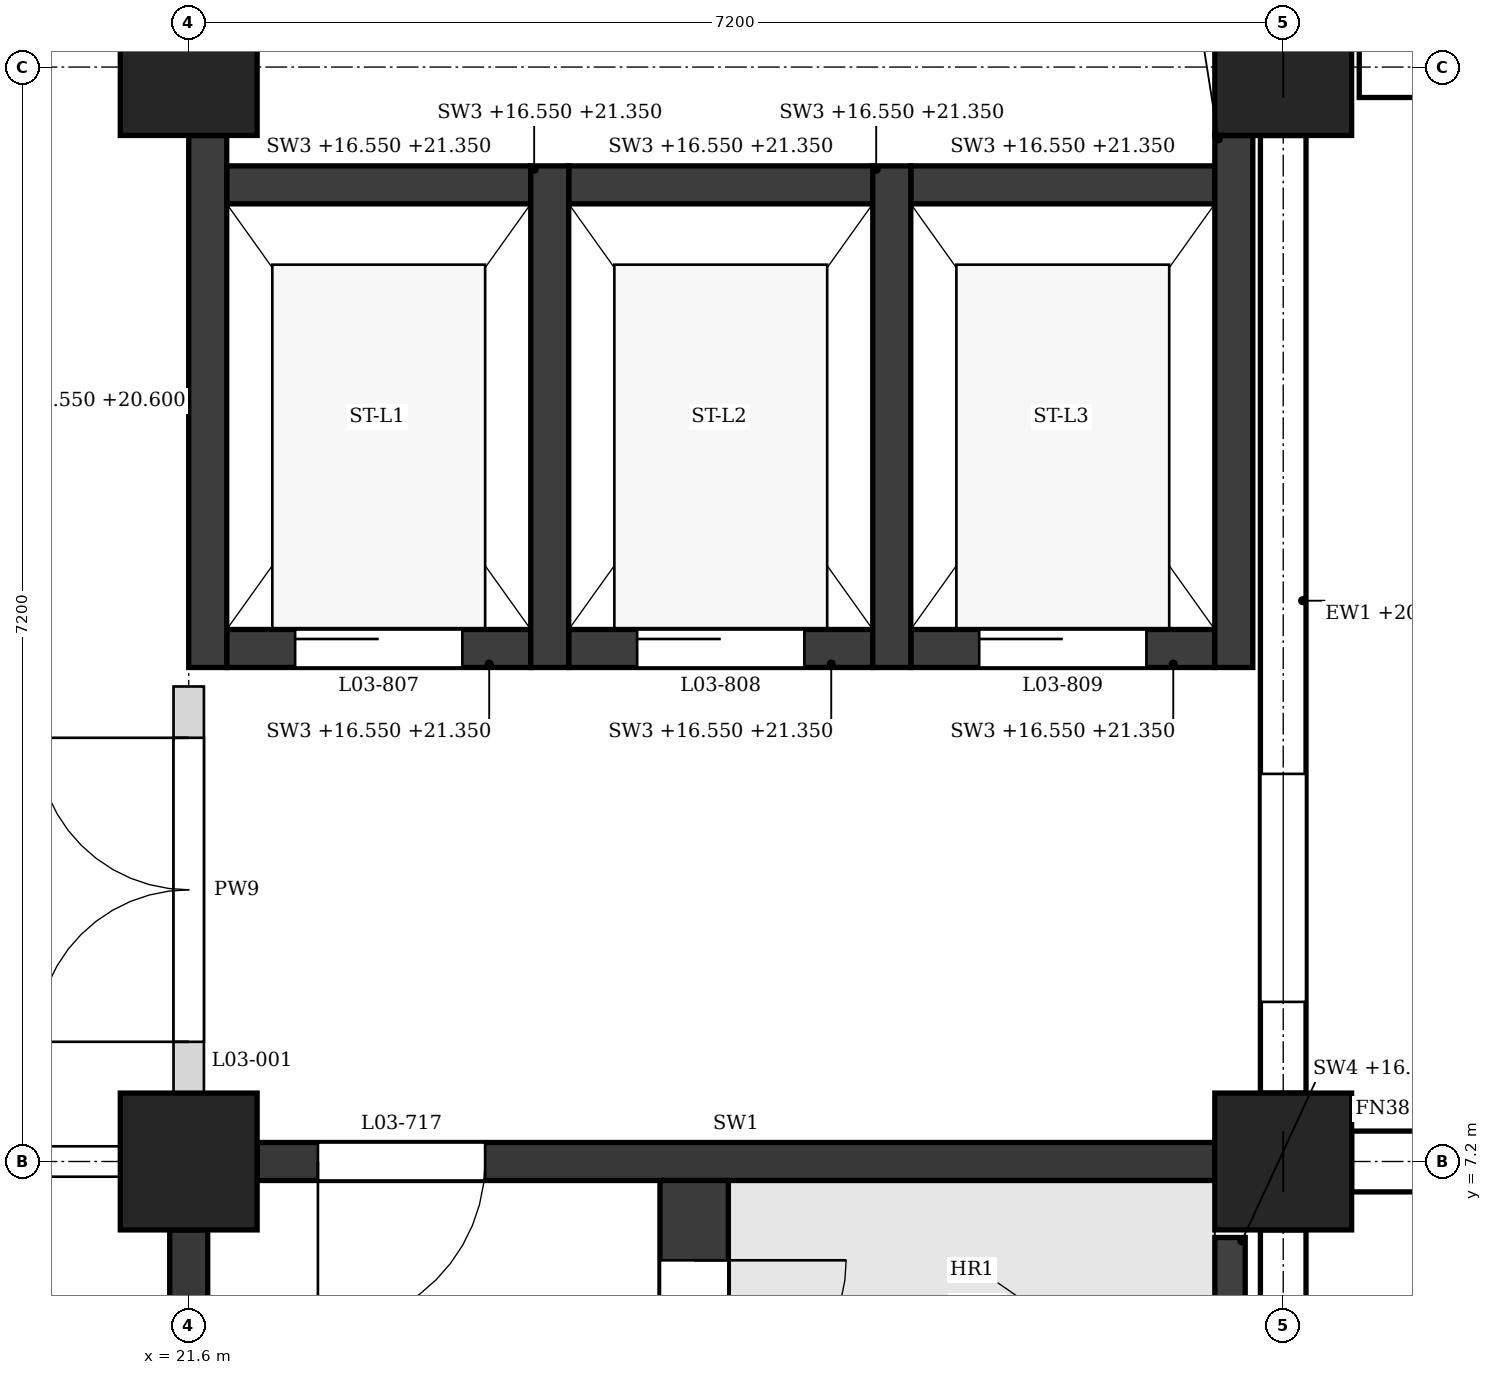
"""IFC4 building model, lengths in metres.
Left out: names, types, materials, properties, quantities, classifications, styles, units other than length and angle.
Written with IfcOpenShell. Run it as: python <this file> out.ifc"""

import sys

from ifc_helpers import new_model, si_unit, direction, frame, frame_2d, origin, origin_2d, place, context, subcontext, project, spatial, polyline, rectangle, outline, extrude, element, fill, save


model = new_model("IFC4")
c1 = context("Model", 3, precision=1e-05, world=origin(), true_north=direction((0.0, 1.0)))
c2 = subcontext(c1, "Body", "Model", "MODEL_VIEW")
j1 = project(units=[si_unit("LENGTHUNIT", "METRE"), si_unit("PLANEANGLEUNIT", "RADIAN")], contexts=[c1])
p1 = place(None, origin())
s1 = spatial("IfcSite", under=j1, at=p1, CompositionType="ELEMENT")
p2 = place(p1, origin())
s2 = spatial("IfcBuilding", under=s1, at=p2, CompositionType="ELEMENT")
p3 = place(p2, frame((0.0, 0.0, 16.8)))
s3 = spatial("IfcBuildingStorey", under=s2, at=p3, CompositionType="ELEMENT", Elevation=16.8)
for number, where, z_axis, x_axis in (
    (1, (21.6, 7.2, 0.0), (0.0, 0.0, 1.0), (1.0, 0.0, 0.0)),
    (2, (21.6, 14.4, 0.0), (0.0, 0.0, 1.0), (1.0, 0.0, 0.0)),
    (3, (28.8, 7.2, 0.0), (0.0, 0.0, 1.0), (1.0, 0.0, 0.0)),
    (4, (28.8, 14.4, 0.0), (0.0, 0.0, 1.0), (1.0, 0.0, 0.0)),
):
    element("IfcColumn", number, at=place(p3, frame(where, z_axis=z_axis, x_axis=x_axis)), inside=s3, PredefinedType="COLUMN", context=c2, shape_type="SweptSolid", body=[
        extrude(rectangle(XDim=0.9, YDim=0.9, at=origin_2d()), origin(), (0.0, 0.0, 1.0), 4.8),
    ])
p4 = place(p3, frame((28.8, 0.45, 0.0), z_axis=(0.0, 0.0, 1.0), x_axis=(0.0, 1.0, 0.0)))
e5 = element("IfcWall", 5, at=p4, inside=s3, PredefinedType="STANDARD", context=c2, shape_type="SweptSolid", body=[
    extrude(rectangle(XDim=6.3, YDim=0.3, at=frame_2d((3.15, 0.0))), origin(), (0.0, 0.0, 1.0), 3.95),
])
p5 = place(p4, frame((0.9, 0.0, 0.9)))
e6 = element("IfcOpeningElement", 6, at=p5, cuts=e5, PredefinedType="OPENING", context=c2, shape_type="SweptSolid", body=[
    extrude(outline(polyline([(0.0, 0.0), (0.9, 0.0), (0.9, 2.05), (0.45, 2.5), (0.0, 2.05), (0.0, 0.0)])), frame((0.0, 0.16, 0.0), z_axis=(0.0, -1.0, 0.0), x_axis=(1.0, 0.0, 0.0)), (0.0, 0.0, 1.0), 0.32),
])
p6 = place(p4, frame((4.5, 0.0, 0.9)))
e7 = element("IfcOpeningElement", 7, at=p6, cuts=e5, PredefinedType="OPENING", context=c2, shape_type="SweptSolid", body=[
    extrude(outline(polyline([(0.0, 0.0), (0.9, 0.0), (0.9, 2.05), (0.45, 2.5), (0.0, 2.05), (0.0, 0.0)])), frame((0.0, 0.16, 0.0), z_axis=(0.0, -1.0, 0.0), x_axis=(1.0, 0.0, 0.0)), (0.0, 0.0, 1.0), 0.32),
])
p7 = place(p3, frame((28.8, 7.65, 0.0), z_axis=(0.0, 0.0, 1.0), x_axis=(0.0, 1.0, 0.0)))
e8 = element("IfcWall", 8, at=p7, inside=s3, PredefinedType="STANDARD", context=c2, shape_type="SweptSolid", body=[
    extrude(rectangle(XDim=6.3, YDim=0.3, at=frame_2d((3.15, 0.0))), origin(), (0.0, 0.0, 1.0), 3.95),
])
p8 = place(p7, frame((0.6, 0.0, 0.9)))
e9 = element("IfcOpeningElement", 9, at=p8, cuts=e8, PredefinedType="OPENING", context=c2, shape_type="SweptSolid", body=[
    extrude(outline(polyline([(0.0, 0.0), (1.5, 0.0), (1.5, 1.75), (0.75, 2.5), (0.0, 1.75), (0.0, 0.0)])), frame((0.0, 0.16, 0.0), z_axis=(0.0, -1.0, 0.0), x_axis=(1.0, 0.0, 0.0)), (0.0, 0.0, 1.0), 0.32),
])
for number, where, z_axis, x_axis in (
    (10, (29.25, 7.2, 0.0), (0.0, 0.0, 1.0), (1.0, 0.0, 0.0)),
    (11, (29.3, 14.4, 0.0), (0.0, 0.0, 1.0), (1.0, 0.0, 0.0)),
):
    element("IfcWall", number, at=place(p3, frame(where, z_axis=z_axis, x_axis=x_axis)), inside=s3, PredefinedType="POLYGONAL", context=c2, shape_type="SweptSolid", body=[
        extrude(outline(polyline([(0.6, 0.0), (0.6, 4.55), (0.0, 4.55), (0.0, 0.0), (0.6, 0.0)])), frame((0.0, 0.2, 0.0), z_axis=(0.0, -1.0, 0.0), x_axis=(1.0, 0.0, 0.0)), (0.0, 0.0, 1.0), 0.4),
    ])
p9 = place(p3, frame((22.05, 7.2, 0.0), z_axis=(0.0, 0.0, 1.0), x_axis=(1.0, 0.0, 0.0)))
e12 = element("IfcWall", 12, at=p9, inside=s3, PredefinedType="SHEAR", context=c2, shape_type="SweptSolid", body=[
    extrude(rectangle(XDim=6.3, YDim=0.25, at=frame_2d((3.15, 0.0))), origin(), (0.0, 0.0, 1.0), 3.8),
])
p10 = place(p9, frame((0.4, 0.0, 0.0)))
e13 = element("IfcOpeningElement", 13, at=p10, cuts=e12, PredefinedType="OPENING", context=c2, shape_type="SweptSolid", body=[
    extrude(rectangle(XDim=1.1, YDim=2.1, at=frame_2d((0.55, 1.05))), frame((0.0, 0.135, 0.0), z_axis=(0.0, -1.0, 0.0), x_axis=(1.0, 0.0, 0.0)), (0.0, 0.0, 1.0), 0.27),
])
p11 = place(p3, frame((21.6, 0.45, 0.0), z_axis=(0.0, 0.0, 1.0), x_axis=(0.0, 1.0, 0.0)))
e14 = element("IfcWall", 14, at=p11, inside=s3, PredefinedType="SHEAR", context=c2, shape_type="SweptSolid", body=[
    extrude(rectangle(XDim=6.3, YDim=0.25, at=frame_2d((3.15, 0.0))), origin(), (0.0, 0.0, 1.0), 3.8),
])
p12 = place(p3, frame((28.45, 5.85, -0.25), z_axis=(0.0, 0.0, 1.0), x_axis=(0.0, 1.0, 0.0)))
e15 = element("IfcWall", 15, at=p12, inside=s3, PredefinedType="SHEAR", context=c2, shape_type="SweptSolid", body=[
    extrude(rectangle(XDim=0.85, YDim=0.2, at=frame_2d((0.425, 0.0))), origin(), (0.0, 0.0, 1.0), 4.8),
])
p13 = place(p3, frame((24.925, 0.225, 0.0), z_axis=(0.0, 0.0, 1.0), x_axis=(0.0, 1.0, 0.0)))
e16 = element("IfcWall", 16, at=p13, inside=s3, PredefinedType="SHEAR", context=c2, shape_type="SweptSolid", body=[
    extrude(rectangle(XDim=6.85, YDim=0.45, at=frame_2d((3.425, 0.0))), origin(), (0.0, 0.0, 1.0), 4.55),
])
p14 = place(p13, frame((5.325, 0.0, 0.0)))
e17 = element("IfcOpeningElement", 17, at=p14, cuts=e16, PredefinedType="OPENING", context=c2, shape_type="SweptSolid", body=[
    extrude(rectangle(XDim=1.0, YDim=2.1, at=frame_2d((0.5, 1.05))), frame((0.0, 0.235, 0.0), z_axis=(0.0, -1.0, 0.0), x_axis=(1.0, 0.0, 0.0)), (0.0, 0.0, 1.0), 0.47),
])
p15 = place(p3, frame((21.725, 10.45, -0.25), z_axis=(0.0, 0.0, 1.0), x_axis=(0.0, 1.0, 0.0)))
e18 = element("IfcWall", 18, at=p15, inside=s3, PredefinedType="SHEAR", context=c2, shape_type="SweptSolid", body=[
    extrude(rectangle(XDim=3.5, YDim=0.25, at=frame_2d((1.75, 0.0))), origin(), (0.0, 0.0, 1.0), 4.05),
])
for number, where, z_axis, x_axis in (
    (19, (23.975, 10.45, -0.25), (0.0, 0.0, 1.0), (0.0, 1.0, 0.0)),
    (20, (26.225, 10.45, -0.25), (0.0, 0.0, 1.0), (0.0, 1.0, 0.0)),
):
    element("IfcWall", number, at=place(p3, frame(where, z_axis=z_axis, x_axis=x_axis)), inside=s3, PredefinedType="SHEAR", context=c2, shape_type="SweptSolid", body=[
        extrude(rectangle(XDim=3.3, YDim=0.25, at=frame_2d((1.65, 0.0))), origin(), (0.0, 0.0, 1.0), 4.8),
    ])
p16 = place(p3, frame((28.475, 10.45, -0.25), z_axis=(0.0, 0.0, 1.0), x_axis=(0.0, 1.0, 0.0)))
e21 = element("IfcWall", 21, at=p16, inside=s3, PredefinedType="SHEAR", context=c2, shape_type="SweptSolid", body=[
    extrude(rectangle(XDim=3.5, YDim=0.25, at=frame_2d((1.75, 0.0))), origin(), (0.0, 0.0, 1.0), 4.8),
])
p17 = place(p3, frame((21.85, 10.575, -0.25), z_axis=(0.0, 0.0, 1.0), x_axis=(1.0, 0.0, 0.0)))
e22 = element("IfcWall", 22, at=p17, inside=s3, PredefinedType="SHEAR", context=c2, shape_type="SweptSolid", body=[
    extrude(rectangle(XDim=2.0, YDim=0.25, at=frame_2d((1.0, 0.0))), origin(), (0.0, 0.0, 1.0), 4.8),
])
p18 = place(p17, frame((0.45, 0.0, 0.25)))
e23 = element("IfcOpeningElement", 23, at=p18, cuts=e22, PredefinedType="OPENING", context=c2, shape_type="SweptSolid", body=[
    extrude(rectangle(XDim=1.1, YDim=2.1, at=frame_2d((0.55, 1.05))), frame((0.0, 0.135, 0.0), z_axis=(0.0, -1.0, 0.0), x_axis=(1.0, 0.0, 0.0)), (0.0, 0.0, 1.0), 0.27),
])
p19 = place(p3, frame((21.85, 13.625, -0.25), z_axis=(0.0, 0.0, 1.0), x_axis=(1.0, 0.0, 0.0)))
e24 = element("IfcWall", 24, at=p19, inside=s3, PredefinedType="SHEAR", context=c2, shape_type="SweptSolid", body=[
    extrude(rectangle(XDim=2.0, YDim=0.25, at=frame_2d((1.0, 0.0))), origin(), (0.0, 0.0, 1.0), 4.8),
])
p20 = place(p3, frame((24.1, 10.575, -0.25), z_axis=(0.0, 0.0, 1.0), x_axis=(1.0, 0.0, 0.0)))
e25 = element("IfcWall", 25, at=p20, inside=s3, PredefinedType="SHEAR", context=c2, shape_type="SweptSolid", body=[
    extrude(rectangle(XDim=2.0, YDim=0.25, at=frame_2d((1.0, 0.0))), origin(), (0.0, 0.0, 1.0), 4.8),
])
p21 = place(p20, frame((0.45, 0.0, 0.25)))
e26 = element("IfcOpeningElement", 26, at=p21, cuts=e25, PredefinedType="OPENING", context=c2, shape_type="SweptSolid", body=[
    extrude(rectangle(XDim=1.1, YDim=2.1, at=frame_2d((0.55, 1.05))), frame((0.0, 0.135, 0.0), z_axis=(0.0, -1.0, 0.0), x_axis=(1.0, 0.0, 0.0)), (0.0, 0.0, 1.0), 0.27),
])
p22 = place(p3, frame((24.1, 13.625, -0.25), z_axis=(0.0, 0.0, 1.0), x_axis=(1.0, 0.0, 0.0)))
e27 = element("IfcWall", 27, at=p22, inside=s3, PredefinedType="SHEAR", context=c2, shape_type="SweptSolid", body=[
    extrude(rectangle(XDim=2.0, YDim=0.25, at=frame_2d((1.0, 0.0))), origin(), (0.0, 0.0, 1.0), 4.8),
])
p23 = place(p3, frame((26.35, 10.575, -0.25), z_axis=(0.0, 0.0, 1.0), x_axis=(1.0, 0.0, 0.0)))
e28 = element("IfcWall", 28, at=p23, inside=s3, PredefinedType="SHEAR", context=c2, shape_type="SweptSolid", body=[
    extrude(rectangle(XDim=2.0, YDim=0.25, at=frame_2d((1.0, 0.0))), origin(), (0.0, 0.0, 1.0), 4.8),
])
p24 = place(p23, frame((0.45, 0.0, 0.25)))
e29 = element("IfcOpeningElement", 29, at=p24, cuts=e28, PredefinedType="OPENING", context=c2, shape_type="SweptSolid", body=[
    extrude(rectangle(XDim=1.1, YDim=2.1, at=frame_2d((0.55, 1.05))), frame((0.0, 0.135, 0.0), z_axis=(0.0, -1.0, 0.0), x_axis=(1.0, 0.0, 0.0)), (0.0, 0.0, 1.0), 0.27),
])
p25 = place(p3, frame((26.35, 13.625, -0.25), z_axis=(0.0, 0.0, 1.0), x_axis=(1.0, 0.0, 0.0)))
e30 = element("IfcWall", 30, at=p25, inside=s3, PredefinedType="SHEAR", context=c2, shape_type="SweptSolid", body=[
    extrude(rectangle(XDim=2.0, YDim=0.25, at=frame_2d((1.0, 0.0))), origin(), (0.0, 0.0, 1.0), 4.8),
])
p26 = place(p3, frame((14.85, 7.2, 0.0), z_axis=(0.0, 0.0, 1.0), x_axis=(1.0, 0.0, 0.0)))
e31 = element("IfcWall", 31, at=p26, inside=s3, PredefinedType="PARTITIONING", context=c2, shape_type="SweptSolid", body=[
    extrude(rectangle(XDim=6.3, YDim=0.2, at=frame_2d((3.15, 0.0))), origin(), (0.0, 0.0, 1.0), 3.8),
])
p27 = place(p26, frame((4.225, 0.0, 0.0)))
e32 = element("IfcOpeningElement", 32, at=p27, cuts=e31, PredefinedType="OPENING", context=c2, shape_type="SweptSolid", body=[
    extrude(rectangle(XDim=1.0, YDim=2.1, at=frame_2d((0.5, 1.05))), frame((0.0, 0.11, 0.0), z_axis=(0.0, -1.0, 0.0), x_axis=(1.0, 0.0, 0.0)), (0.0, 0.0, 1.0), 0.22),
])
p28 = place(p3, frame((21.6, 7.65, 0.0), z_axis=(0.0, 0.0, 1.0), x_axis=(0.0, 1.0, 0.0)))
e33 = element("IfcWall", 33, at=p28, inside=s3, PredefinedType="PARTITIONING", context=c2, shape_type="SweptSolid", body=[
    extrude(rectangle(XDim=2.675, YDim=0.2, at=frame_2d((1.337, 0.0))), origin(), (0.0, 0.0, 1.0), 3.8),
])
p29 = place(p28, frame((0.337, 0.0, 0.0)))
e34 = element("IfcOpeningElement", 34, at=p29, cuts=e33, PredefinedType="OPENING", context=c2, shape_type="SweptSolid", body=[
    extrude(rectangle(XDim=2.0, YDim=2.4, at=frame_2d((1.0, 1.2))), frame((0.0, 0.11, 0.0), z_axis=(0.0, -1.0, 0.0), x_axis=(1.0, 0.0, 0.0)), (0.0, 0.0, 1.0), 0.22),
])
p30 = place(p8, origin())
e35 = element("IfcWindow", 35, at=p30, inside=s3, PartitioningType="SINGLE_PANEL", PredefinedType="WINDOW", context=c2, shape_type="SweptSolid", body=[
    extrude(outline(polyline([(0.0, 0.0), (1.5, 0.0), (1.5, 1.75), (0.75, 2.5), (0.0, 1.75), (0.0, 0.0)])), frame((0.0, 0.03, 0.0), z_axis=(0.0, -1.0, 0.0), x_axis=(1.0, 0.0, 0.0)), (0.0, 0.0, 1.0), 0.06),
])
fill(e9, e35)
p31 = place(p14, frame((1.0, 0.0, 0.0), z_axis=(0.0, 0.0, 1.0), x_axis=(-1.0, 0.0, 0.0)))
e36 = element("IfcDoor", 36, at=p31, inside=s3, OperationType="SINGLE_SWING_LEFT", PredefinedType="DOOR", context=c2, shape_type="SweptSolid", body=[
    extrude(rectangle(XDim=1.0, YDim=2.1, at=frame_2d((0.5, 1.05))), frame((0.0, 0.025, 0.0), z_axis=(0.0, -1.0, 0.0), x_axis=(1.0, 0.0, 0.0)), (0.0, 0.0, 1.0), 0.05),
])
fill(e17, e36)
p32 = place(p10, frame((1.1, 0.0, 0.0), z_axis=(0.0, 0.0, 1.0), x_axis=(-1.0, 0.0, 0.0)))
e37 = element("IfcDoor", 37, at=p32, inside=s3, OperationType="SINGLE_SWING_RIGHT", PredefinedType="DOOR", context=c2, shape_type="SweptSolid", body=[
    extrude(rectangle(XDim=1.1, YDim=2.1, at=frame_2d((0.55, 1.05))), frame((0.0, 0.025, 0.0), z_axis=(0.0, -1.0, 0.0), x_axis=(1.0, 0.0, 0.0)), (0.0, 0.0, 1.0), 0.05),
])
fill(e13, e37)
p33 = place(p18, origin())
e38 = element("IfcDoor", 38, at=p33, inside=s3, OperationType="SLIDING_TO_LEFT", PredefinedType="DOOR", context=c2, shape_type="SweptSolid", body=[
    extrude(rectangle(XDim=1.1, YDim=2.1, at=frame_2d((0.55, 1.05))), frame((0.0, 0.025, 0.0), z_axis=(0.0, -1.0, 0.0), x_axis=(1.0, 0.0, 0.0)), (0.0, 0.0, 1.0), 0.05),
])
fill(e23, e38)
p34 = place(p21, origin())
e39 = element("IfcDoor", 39, at=p34, inside=s3, OperationType="SLIDING_TO_LEFT", PredefinedType="DOOR", context=c2, shape_type="SweptSolid", body=[
    extrude(rectangle(XDim=1.1, YDim=2.1, at=frame_2d((0.55, 1.05))), frame((0.0, 0.025, 0.0), z_axis=(0.0, -1.0, 0.0), x_axis=(1.0, 0.0, 0.0)), (0.0, 0.0, 1.0), 0.05),
])
fill(e26, e39)
p35 = place(p24, origin())
e40 = element("IfcDoor", 40, at=p35, inside=s3, OperationType="SLIDING_TO_LEFT", PredefinedType="DOOR", context=c2, shape_type="SweptSolid", body=[
    extrude(rectangle(XDim=1.1, YDim=2.1, at=frame_2d((0.55, 1.05))), frame((0.0, 0.025, 0.0), z_axis=(0.0, -1.0, 0.0), x_axis=(1.0, 0.0, 0.0)), (0.0, 0.0, 1.0), 0.05),
])
fill(e29, e40)
p36 = place(p29, origin())
e41 = element("IfcDoor", 41, at=p36, inside=s3, OperationType="DOUBLE_DOOR_SINGLE_SWING", PredefinedType="DOOR", context=c2, shape_type="SweptSolid", body=[
    extrude(rectangle(XDim=2.0, YDim=2.4, at=frame_2d((1.0, 1.2))), frame((0.0, 0.025, 0.0), z_axis=(0.0, -1.0, 0.0), x_axis=(1.0, 0.0, 0.0)), (0.0, 0.0, 1.0), 0.05),
])
fill(e34, e41)
save(model, sys.argv[1])
